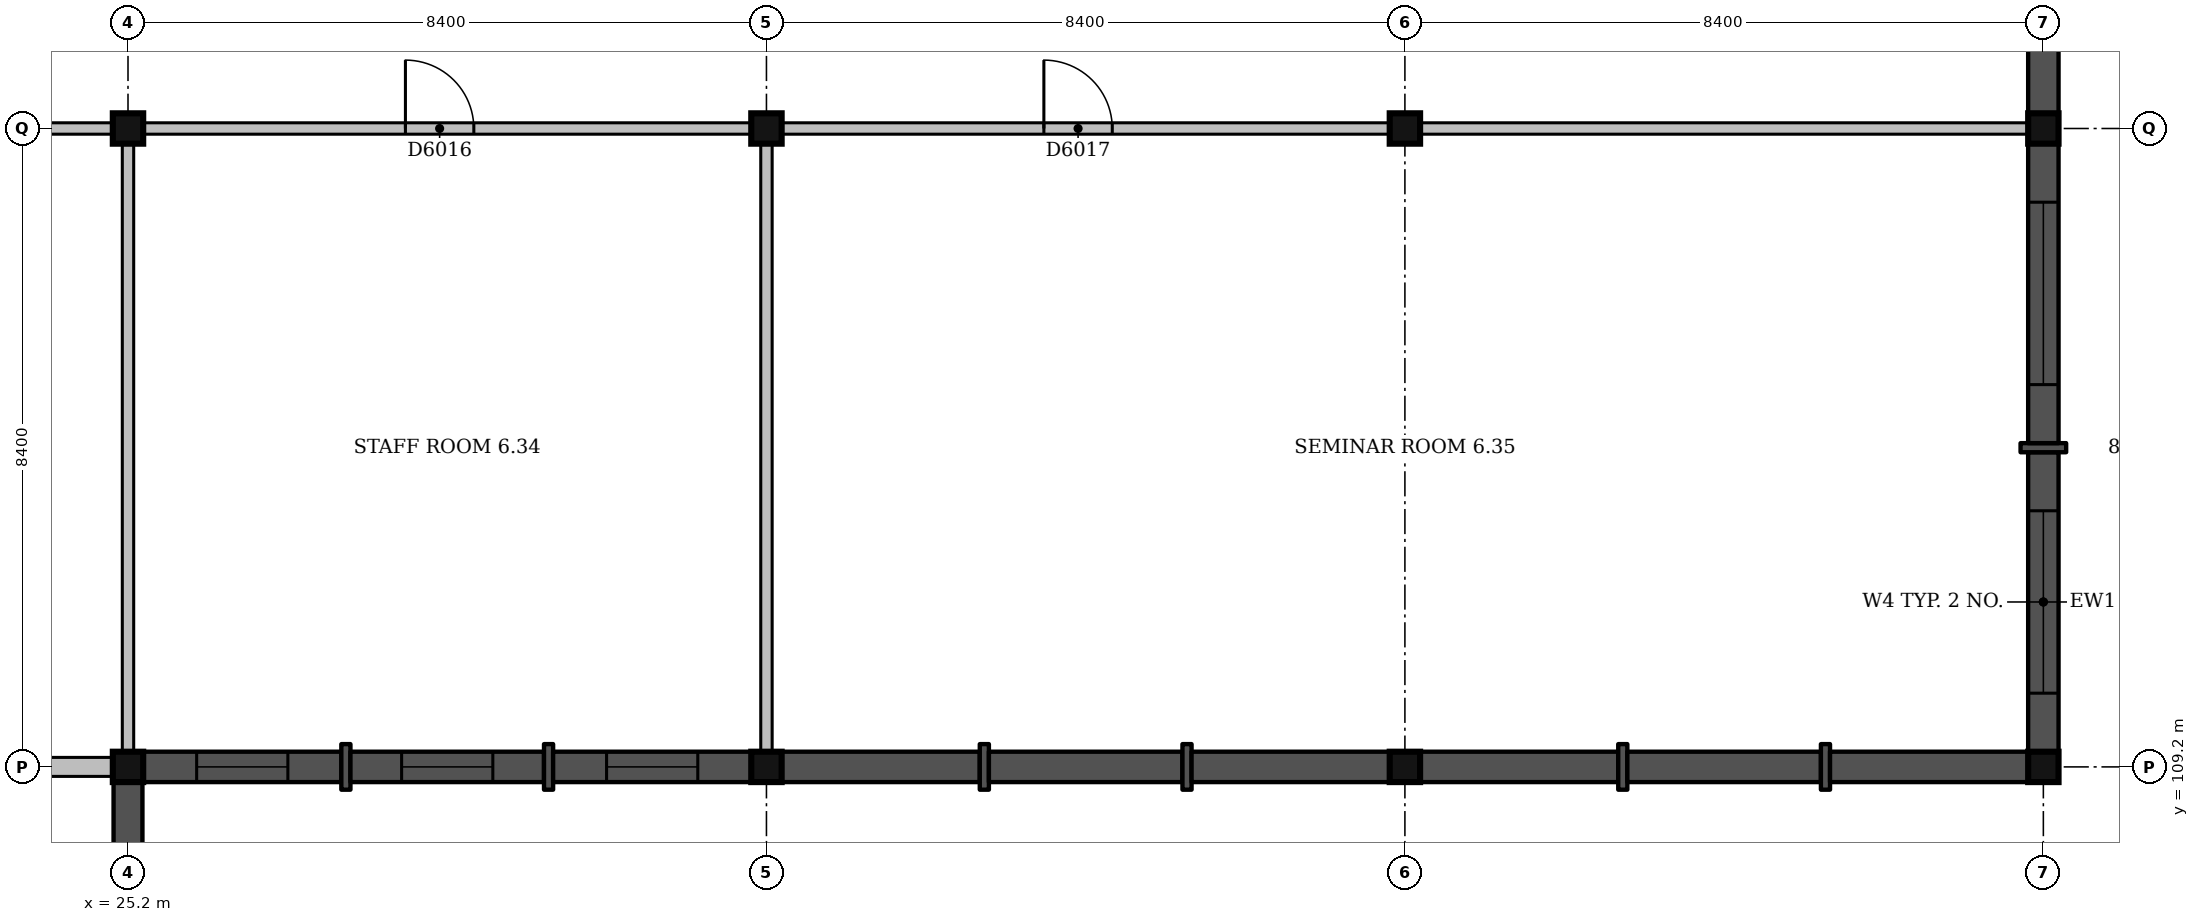
"""IFC4 building model, lengths in metres.
Left out: names, types, materials, properties, quantities, classifications, styles, units other than length and angle.
Written with IfcOpenShell. Run it as: python <this file> out.ifc"""

import sys

from ifc_helpers import new_model, si_unit, direction, frame, frame_2d, origin, origin_2d, place, context, subcontext, project, spatial, rectangle, extrude, element, fill, save


model = new_model("IFC4")
c1 = context("Model", 3, precision=1e-05, world=origin(), true_north=direction((0.0, 1.0)))
c2 = subcontext(c1, "Body", "Model", "MODEL_VIEW")
j1 = project(units=[si_unit("LENGTHUNIT", "METRE"), si_unit("PLANEANGLEUNIT", "RADIAN")], contexts=[c1])
p1 = place(None, origin())
s1 = spatial("IfcSite", under=j1, at=p1, CompositionType="ELEMENT")
p2 = place(p1, origin())
s2 = spatial("IfcBuilding", under=s1, at=p2, CompositionType="ELEMENT")
p3 = place(p2, frame((0.0, 0.0, 27.0)))
s3 = spatial("IfcBuildingStorey", under=s2, at=p3, CompositionType="ELEMENT", Elevation=27.0)
for number, where, z_axis, x_axis in (
    (1, (25.2, 109.2, 0.0), (0.0, 0.0, 1.0), (1.0, 0.0, 0.0)),
    (2, (25.2, 117.6, 0.0), (0.0, 0.0, 1.0), (1.0, 0.0, 0.0)),
    (3, (33.6, 109.2, 0.0), (0.0, 0.0, 1.0), (1.0, 0.0, 0.0)),
    (4, (33.6, 117.6, 0.0), (0.0, 0.0, 1.0), (1.0, 0.0, 0.0)),
    (5, (42.0, 109.2, 0.0), (0.0, 0.0, 1.0), (1.0, 0.0, 0.0)),
    (6, (42.0, 117.6, 0.0), (0.0, 0.0, 1.0), (1.0, 0.0, 0.0)),
    (7, (50.4, 109.2, 0.0), (0.0, 0.0, 1.0), (1.0, 0.0, 0.0)),
    (8, (50.4, 117.6, 0.0), (0.0, 0.0, 1.0), (1.0, 0.0, 0.0)),
):
    element("IfcColumn", number, at=place(p3, frame(where, z_axis=z_axis, x_axis=x_axis)), inside=s3, PredefinedType="COLUMN", context=c2, shape_type="SweptSolid", body=[
        extrude(rectangle(XDim=0.4, YDim=0.4, at=origin_2d()), origin(), (0.0, 0.0, 1.0), 4.5),
    ])
p4 = place(p3, frame((25.2, 106.633, 0.0), z_axis=(0.0, 0.0, 1.0), x_axis=(0.0, 1.0, 0.0)))
e9 = element("IfcWall", 9, at=p4, inside=s3, PredefinedType="SOLIDWALL", context=c2, shape_type="SweptSolid", body=[
    extrude(rectangle(XDim=2.367, YDim=0.38, at=frame_2d((1.183, 0.0))), origin(), (0.0, 0.0, 1.0), 3.35),
])
p5 = place(p3, frame((50.4, 109.4, 0.0), z_axis=(0.0, 0.0, 1.0), x_axis=(0.0, 1.0, 0.0)))
e10 = element("IfcWall", 10, at=p5, inside=s3, PredefinedType="SOLIDWALL", context=c2, shape_type="SweptSolid", body=[
    extrude(rectangle(XDim=3.94, YDim=0.4, at=frame_2d((1.97, 0.0))), origin(), (0.0, 0.0, 1.0), 3.6),
])
p6 = place(p5, frame((0.77, 0.0, 0.6)))
e11 = element("IfcOpeningElement", 11, at=p6, cuts=e10, PredefinedType="OPENING", context=c2, shape_type="SweptSolid", body=[
    extrude(rectangle(XDim=2.4, YDim=2.4, at=frame_2d((1.2, 1.2))), frame((0.0, 0.21, 0.0), z_axis=(0.0, -1.0, 0.0), x_axis=(1.0, 0.0, 0.0)), (0.0, 0.0, 1.0), 0.42),
])
p7 = place(p3, frame((50.4, 113.34, 0.0), z_axis=(0.0, 0.0, 1.0), x_axis=(0.0, 1.0, 0.0)))
e12 = element("IfcWall", 12, at=p7, inside=s3, PredefinedType="SOLIDWALL", context=c2, shape_type="SweptSolid", body=[
    extrude(rectangle(XDim=0.12, YDim=0.6, at=frame_2d((0.06, 0.0))), origin(), (0.0, 0.0, 1.0), 3.6),
])
p8 = place(p3, frame((50.4, 113.46, 0.0), z_axis=(0.0, 0.0, 1.0), x_axis=(0.0, 1.0, 0.0)))
e13 = element("IfcWall", 13, at=p8, inside=s3, PredefinedType="SOLIDWALL", context=c2, shape_type="SweptSolid", body=[
    extrude(rectangle(XDim=3.94, YDim=0.4, at=frame_2d((1.97, 0.0))), origin(), (0.0, 0.0, 1.0), 3.6),
])
p9 = place(p8, frame((0.77, 0.0, 0.6)))
e14 = element("IfcOpeningElement", 14, at=p9, cuts=e13, PredefinedType="OPENING", context=c2, shape_type="SweptSolid", body=[
    extrude(rectangle(XDim=2.4, YDim=2.4, at=frame_2d((1.2, 1.2))), frame((0.0, 0.21, 0.0), z_axis=(0.0, -1.0, 0.0), x_axis=(1.0, 0.0, 0.0)), (0.0, 0.0, 1.0), 0.42),
])
p10 = place(p3, frame((50.4, 117.8, 0.0), z_axis=(0.0, 0.0, 1.0), x_axis=(0.0, 1.0, 0.0)))
e15 = element("IfcWall", 15, at=p10, inside=s3, PredefinedType="SOLIDWALL", context=c2, shape_type="SweptSolid", body=[
    extrude(rectangle(XDim=2.607, YDim=0.4, at=frame_2d((1.303, 0.0))), origin(), (0.0, 0.0, 1.0), 3.6),
])
p11 = place(p3, frame((25.4, 109.2, 0.0), z_axis=(0.0, 0.0, 1.0), x_axis=(1.0, 0.0, 0.0)))
e16 = element("IfcWall", 16, at=p11, inside=s3, PredefinedType="SOLIDWALL", context=c2, shape_type="SweptSolid", body=[
    extrude(rectangle(XDim=2.607, YDim=0.4, at=frame_2d((1.303, 0.0))), origin(), (0.0, 0.0, 1.0), 4.2),
])
p12 = place(p11, frame((0.703, 0.0, 0.9)))
e17 = element("IfcOpeningElement", 17, at=p12, cuts=e16, PredefinedType="OPENING", context=c2, shape_type="SweptSolid", body=[
    extrude(rectangle(XDim=1.2, YDim=2.1, at=frame_2d((0.6, 1.05))), frame((0.0, 0.21, 0.0), z_axis=(0.0, -1.0, 0.0), x_axis=(1.0, 0.0, 0.0)), (0.0, 0.0, 1.0), 0.42),
])
p13 = place(p3, frame((28.007, 109.2, 0.0), z_axis=(0.0, 0.0, 1.0), x_axis=(1.0, 0.0, 0.0)))
e18 = element("IfcWall", 18, at=p13, inside=s3, PredefinedType="SOLIDWALL", context=c2, shape_type="SweptSolid", body=[
    extrude(rectangle(XDim=0.12, YDim=0.6, at=frame_2d((0.06, 0.0))), origin(), (0.0, 0.0, 1.0), 4.2),
])
p14 = place(p3, frame((28.127, 109.2, 0.0), z_axis=(0.0, 0.0, 1.0), x_axis=(1.0, 0.0, 0.0)))
e19 = element("IfcWall", 19, at=p14, inside=s3, PredefinedType="SOLIDWALL", context=c2, shape_type="SweptSolid", body=[
    extrude(rectangle(XDim=2.547, YDim=0.4, at=frame_2d((1.273, 0.0))), origin(), (0.0, 0.0, 1.0), 4.2),
])
p15 = place(p14, frame((0.673, 0.0, 0.9)))
e20 = element("IfcOpeningElement", 20, at=p15, cuts=e19, PredefinedType="OPENING", context=c2, shape_type="SweptSolid", body=[
    extrude(rectangle(XDim=1.2, YDim=2.1, at=frame_2d((0.6, 1.05))), frame((0.0, 0.21, 0.0), z_axis=(0.0, -1.0, 0.0), x_axis=(1.0, 0.0, 0.0)), (0.0, 0.0, 1.0), 0.42),
])
p16 = place(p3, frame((30.673, 109.2, 0.0), z_axis=(0.0, 0.0, 1.0), x_axis=(1.0, 0.0, 0.0)))
e21 = element("IfcWall", 21, at=p16, inside=s3, PredefinedType="SOLIDWALL", context=c2, shape_type="SweptSolid", body=[
    extrude(rectangle(XDim=0.12, YDim=0.6, at=frame_2d((0.06, 0.0))), origin(), (0.0, 0.0, 1.0), 4.2),
])
p17 = place(p3, frame((30.793, 109.2, 0.0), z_axis=(0.0, 0.0, 1.0), x_axis=(1.0, 0.0, 0.0)))
e22 = element("IfcWall", 22, at=p17, inside=s3, PredefinedType="SOLIDWALL", context=c2, shape_type="SweptSolid", body=[
    extrude(rectangle(XDim=2.607, YDim=0.4, at=frame_2d((1.303, 0.0))), origin(), (0.0, 0.0, 1.0), 4.2),
])
p18 = place(p17, frame((0.703, 0.0, 0.9)))
e23 = element("IfcOpeningElement", 23, at=p18, cuts=e22, PredefinedType="OPENING", context=c2, shape_type="SweptSolid", body=[
    extrude(rectangle(XDim=1.2, YDim=2.1, at=frame_2d((0.6, 1.05))), frame((0.0, 0.21, 0.0), z_axis=(0.0, -1.0, 0.0), x_axis=(1.0, 0.0, 0.0)), (0.0, 0.0, 1.0), 0.42),
])
p19 = place(p3, frame((33.8, 109.2, 0.0), z_axis=(0.0, 0.0, 1.0), x_axis=(1.0, 0.0, 0.0)))
e24 = element("IfcWall", 24, at=p19, inside=s3, PredefinedType="SOLIDWALL", context=c2, shape_type="SweptSolid", body=[
    extrude(rectangle(XDim=2.607, YDim=0.4, at=frame_2d((1.303, 0.0))), origin(), (0.0, 0.0, 1.0), 3.35),
])
p20 = place(p3, frame((36.407, 109.2, 0.0), z_axis=(0.0, 0.0, 1.0), x_axis=(1.0, 0.0, 0.0)))
e25 = element("IfcWall", 25, at=p20, inside=s3, PredefinedType="SOLIDWALL", context=c2, shape_type="SweptSolid", body=[
    extrude(rectangle(XDim=0.12, YDim=0.6, at=frame_2d((0.06, 0.0))), origin(), (0.0, 0.0, 1.0), 3.35),
])
p21 = place(p3, frame((36.527, 109.2, 0.0), z_axis=(0.0, 0.0, 1.0), x_axis=(1.0, 0.0, 0.0)))
e26 = element("IfcWall", 26, at=p21, inside=s3, PredefinedType="SOLIDWALL", context=c2, shape_type="SweptSolid", body=[
    extrude(rectangle(XDim=2.547, YDim=0.4, at=frame_2d((1.273, 0.0))), origin(), (0.0, 0.0, 1.0), 3.35),
])
p22 = place(p3, frame((39.073, 109.2, 0.0), z_axis=(0.0, 0.0, 1.0), x_axis=(1.0, 0.0, 0.0)))
e27 = element("IfcWall", 27, at=p22, inside=s3, PredefinedType="SOLIDWALL", context=c2, shape_type="SweptSolid", body=[
    extrude(rectangle(XDim=0.12, YDim=0.6, at=frame_2d((0.06, 0.0))), origin(), (0.0, 0.0, 1.0), 3.35),
])
p23 = place(p3, frame((39.193, 109.2, 0.0), z_axis=(0.0, 0.0, 1.0), x_axis=(1.0, 0.0, 0.0)))
e28 = element("IfcWall", 28, at=p23, inside=s3, PredefinedType="SOLIDWALL", context=c2, shape_type="SweptSolid", body=[
    extrude(rectangle(XDim=2.607, YDim=0.4, at=frame_2d((1.303, 0.0))), origin(), (0.0, 0.0, 1.0), 3.35),
])
p24 = place(p3, frame((42.2, 109.2, 0.0), z_axis=(0.0, 0.0, 1.0), x_axis=(1.0, 0.0, 0.0)))
e29 = element("IfcWall", 29, at=p24, inside=s3, PredefinedType="SOLIDWALL", context=c2, shape_type="SweptSolid", body=[
    extrude(rectangle(XDim=2.607, YDim=0.4, at=frame_2d((1.303, 0.0))), origin(), (0.0, 0.0, 1.0), 3.6),
])
p25 = place(p3, frame((44.807, 109.2, 0.0), z_axis=(0.0, 0.0, 1.0), x_axis=(1.0, 0.0, 0.0)))
e30 = element("IfcWall", 30, at=p25, inside=s3, PredefinedType="SOLIDWALL", context=c2, shape_type="SweptSolid", body=[
    extrude(rectangle(XDim=0.12, YDim=0.6, at=frame_2d((0.06, 0.0))), origin(), (0.0, 0.0, 1.0), 3.6),
])
p26 = place(p3, frame((44.927, 109.2, 0.0), z_axis=(0.0, 0.0, 1.0), x_axis=(1.0, 0.0, 0.0)))
e31 = element("IfcWall", 31, at=p26, inside=s3, PredefinedType="SOLIDWALL", context=c2, shape_type="SweptSolid", body=[
    extrude(rectangle(XDim=2.547, YDim=0.4, at=frame_2d((1.273, 0.0))), origin(), (0.0, 0.0, 1.0), 3.6),
])
p27 = place(p3, frame((47.473, 109.2, 0.0), z_axis=(0.0, 0.0, 1.0), x_axis=(1.0, 0.0, 0.0)))
e32 = element("IfcWall", 32, at=p27, inside=s3, PredefinedType="SOLIDWALL", context=c2, shape_type="SweptSolid", body=[
    extrude(rectangle(XDim=0.12, YDim=0.6, at=frame_2d((0.06, 0.0))), origin(), (0.0, 0.0, 1.0), 3.6),
])
p28 = place(p3, frame((47.593, 109.2, 0.0), z_axis=(0.0, 0.0, 1.0), x_axis=(1.0, 0.0, 0.0)))
e33 = element("IfcWall", 33, at=p28, inside=s3, PredefinedType="SOLIDWALL", context=c2, shape_type="SweptSolid", body=[
    extrude(rectangle(XDim=2.607, YDim=0.4, at=frame_2d((1.303, 0.0))), origin(), (0.0, 0.0, 1.0), 3.6),
])
p29 = place(p3, frame((17.0, 109.2, 0.0), z_axis=(0.0, 0.0, 1.0), x_axis=(1.0, 0.0, 0.0)))
e34 = element("IfcWall", 34, at=p29, inside=s3, PredefinedType="SOLIDWALL", context=c2, shape_type="SweptSolid", body=[
    extrude(rectangle(XDim=8.0, YDim=0.25, at=frame_2d((4.0, 0.0))), origin(), (0.0, 0.0, 1.0), 3.35),
])
p30 = place(p3, frame((17.0, 117.6, 0.0), z_axis=(0.0, 0.0, 1.0), x_axis=(1.0, 0.0, 0.0)))
e35 = element("IfcWall", 35, at=p30, inside=s3, PredefinedType="PARTITIONING", context=c2, shape_type="SweptSolid", body=[
    extrude(rectangle(XDim=8.0, YDim=0.15, at=frame_2d((4.0, 0.0))), origin(), (0.0, 0.0, 1.0), 3.4),
])
p31 = place(p30, frame((3.45, 0.0, 0.0)))
e36 = element("IfcOpeningElement", 36, at=p31, cuts=e35, PredefinedType="OPENING", context=c2, shape_type="SweptSolid", body=[
    extrude(rectangle(XDim=0.9, YDim=2.1, at=frame_2d((0.45, 1.05))), frame((0.0, 0.085, 0.0), z_axis=(0.0, -1.0, 0.0), x_axis=(1.0, 0.0, 0.0)), (0.0, 0.0, 1.0), 0.17),
])
p32 = place(p3, frame((25.4, 117.6, 0.0), z_axis=(0.0, 0.0, 1.0), x_axis=(1.0, 0.0, 0.0)))
e37 = element("IfcWall", 37, at=p32, inside=s3, PredefinedType="PARTITIONING", context=c2, shape_type="SweptSolid", body=[
    extrude(rectangle(XDim=8.0, YDim=0.15, at=frame_2d((4.0, 0.0))), origin(), (0.0, 0.0, 1.0), 3.4),
])
p33 = place(p32, frame((3.45, 0.0, 0.0)))
e38 = element("IfcOpeningElement", 38, at=p33, cuts=e37, PredefinedType="OPENING", context=c2, shape_type="SweptSolid", body=[
    extrude(rectangle(XDim=0.9, YDim=2.1, at=frame_2d((0.45, 1.05))), frame((0.0, 0.085, 0.0), z_axis=(0.0, -1.0, 0.0), x_axis=(1.0, 0.0, 0.0)), (0.0, 0.0, 1.0), 0.17),
])
p34 = place(p3, frame((33.8, 117.6, 0.0), z_axis=(0.0, 0.0, 1.0), x_axis=(1.0, 0.0, 0.0)))
e39 = element("IfcWall", 39, at=p34, inside=s3, PredefinedType="PARTITIONING", context=c2, shape_type="SweptSolid", body=[
    extrude(rectangle(XDim=8.0, YDim=0.15, at=frame_2d((4.0, 0.0))), origin(), (0.0, 0.0, 1.0), 3.35),
])
p35 = place(p34, frame((3.45, 0.0, 0.0)))
e40 = element("IfcOpeningElement", 40, at=p35, cuts=e39, PredefinedType="OPENING", context=c2, shape_type="SweptSolid", body=[
    extrude(rectangle(XDim=0.9, YDim=2.1, at=frame_2d((0.45, 1.05))), frame((0.0, 0.085, 0.0), z_axis=(0.0, -1.0, 0.0), x_axis=(1.0, 0.0, 0.0)), (0.0, 0.0, 1.0), 0.17),
])
for number, where, z_axis, x_axis in (
    (41, (42.2, 117.6, 0.0), (0.0, 0.0, 1.0), (1.0, 0.0, 0.0)),
    (42, (25.2, 109.4, 0.0), (0.0, 0.0, 1.0), (0.0, 1.0, 0.0)),
    (43, (33.6, 109.4, 0.0), (0.0, 0.0, 1.0), (0.0, 1.0, 0.0)),
):
    element("IfcWall", number, at=place(p3, frame(where, z_axis=z_axis, x_axis=x_axis)), inside=s3, PredefinedType="PARTITIONING", context=c2, shape_type="SweptSolid", body=[
        extrude(rectangle(XDim=8.0, YDim=0.15, at=frame_2d((4.0, 0.0))), origin(), (0.0, 0.0, 1.0), 3.35),
    ])
p36 = place(p6, origin())
e44 = element("IfcWindow", 44, at=p36, inside=s3, PartitioningType="SINGLE_PANEL", PredefinedType="WINDOW", context=c2, shape_type="SweptSolid", body=[
    extrude(rectangle(XDim=2.4, YDim=2.4, at=frame_2d((1.2, 1.2))), frame((0.0, 0.16, 0.0), z_axis=(0.0, -1.0, 0.0), x_axis=(1.0, 0.0, 0.0)), (0.0, 0.0, 1.0), 0.06),
])
fill(e11, e44)
p37 = place(p9, origin())
e45 = element("IfcWindow", 45, at=p37, inside=s3, PartitioningType="SINGLE_PANEL", PredefinedType="WINDOW", context=c2, shape_type="SweptSolid", body=[
    extrude(rectangle(XDim=2.4, YDim=2.4, at=frame_2d((1.2, 1.2))), frame((0.0, 0.16, 0.0), z_axis=(0.0, -1.0, 0.0), x_axis=(1.0, 0.0, 0.0)), (0.0, 0.0, 1.0), 0.06),
])
fill(e14, e45)
p38 = place(p12, origin())
e46 = element("IfcWindow", 46, at=p38, inside=s3, PartitioningType="SINGLE_PANEL", PredefinedType="WINDOW", context=c2, shape_type="SweptSolid", body=[
    extrude(rectangle(XDim=1.2, YDim=2.1, at=frame_2d((0.6, 1.05))), frame((0.0, 0.16, 0.0), z_axis=(0.0, -1.0, 0.0), x_axis=(1.0, 0.0, 0.0)), (0.0, 0.0, 1.0), 0.06),
])
fill(e17, e46)
p39 = place(p15, origin())
e47 = element("IfcWindow", 47, at=p39, inside=s3, PartitioningType="SINGLE_PANEL", PredefinedType="WINDOW", context=c2, shape_type="SweptSolid", body=[
    extrude(rectangle(XDim=1.2, YDim=2.1, at=frame_2d((0.6, 1.05))), frame((0.0, 0.16, 0.0), z_axis=(0.0, -1.0, 0.0), x_axis=(1.0, 0.0, 0.0)), (0.0, 0.0, 1.0), 0.06),
])
fill(e20, e47)
p40 = place(p18, origin())
e48 = element("IfcWindow", 48, at=p40, inside=s3, PartitioningType="SINGLE_PANEL", PredefinedType="WINDOW", context=c2, shape_type="SweptSolid", body=[
    extrude(rectangle(XDim=1.2, YDim=2.1, at=frame_2d((0.6, 1.05))), frame((0.0, 0.16, 0.0), z_axis=(0.0, -1.0, 0.0), x_axis=(1.0, 0.0, 0.0)), (0.0, 0.0, 1.0), 0.06),
])
fill(e23, e48)
p41 = place(p33, origin())
e49 = element("IfcDoor", 49, at=p41, inside=s3, OperationType="SINGLE_SWING_LEFT", PredefinedType="DOOR", context=c2, shape_type="SweptSolid", body=[
    extrude(rectangle(XDim=0.9, YDim=2.1, at=frame_2d((0.45, 1.05))), frame((0.0, 0.025, 0.0), z_axis=(0.0, -1.0, 0.0), x_axis=(1.0, 0.0, 0.0)), (0.0, 0.0, 1.0), 0.05),
])
fill(e38, e49)
p42 = place(p35, origin())
e50 = element("IfcDoor", 50, at=p42, inside=s3, OperationType="SINGLE_SWING_LEFT", PredefinedType="DOOR", context=c2, shape_type="SweptSolid", body=[
    extrude(rectangle(XDim=0.9, YDim=2.1, at=frame_2d((0.45, 1.05))), frame((0.0, 0.025, 0.0), z_axis=(0.0, -1.0, 0.0), x_axis=(1.0, 0.0, 0.0)), (0.0, 0.0, 1.0), 0.05),
])
fill(e40, e50)
save(model, sys.argv[1])
